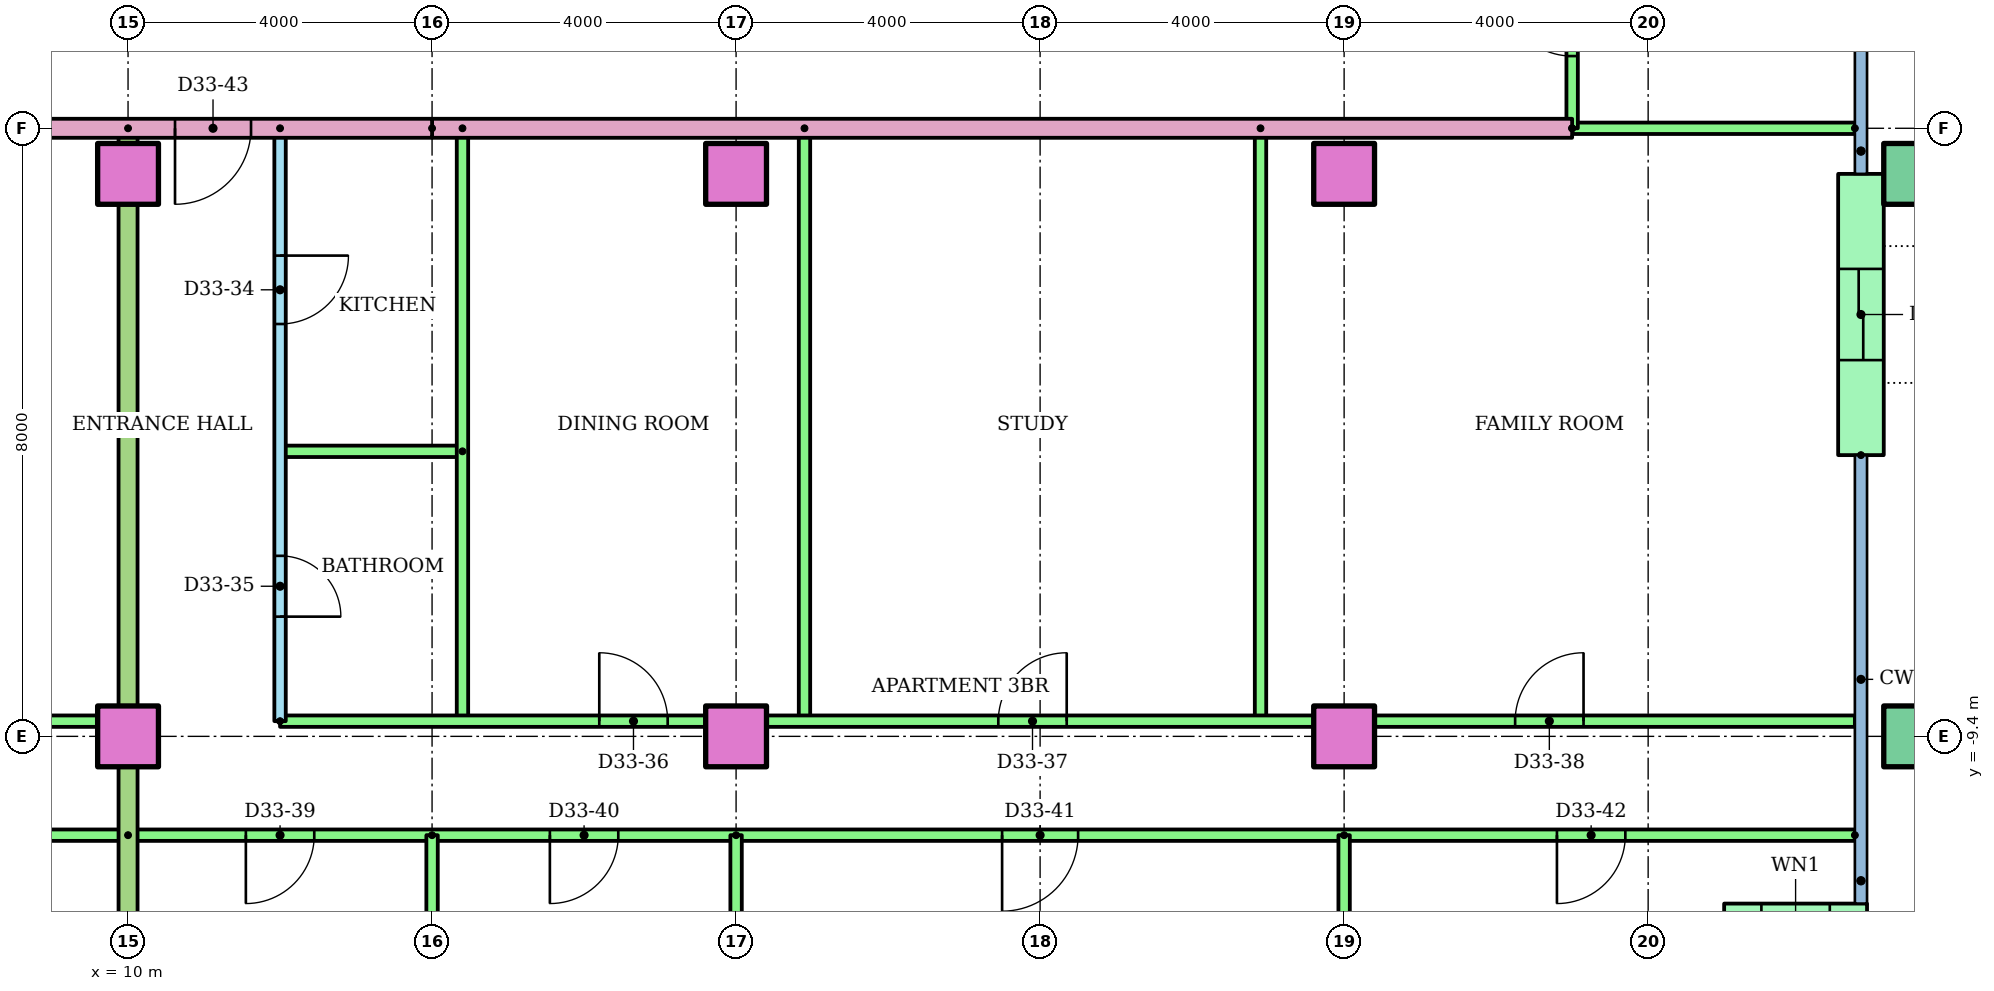
"""IFC4 building model, lengths in metres.
Left out: names, types, materials, properties, quantities, classifications, styles, units other than length and angle.
Written with IfcOpenShell. Run it as: python <this file> out.ifc"""

import sys

from ifc_helpers import new_model, si_unit, direction, frame, frame_2d, origin, origin_2d, place, context, subcontext, project, spatial, rectangle, hollow_rectangle, extrude, element, fill, save


model = new_model("IFC4")
c1 = context("Model", 3, precision=1e-05, world=origin(), true_north=direction((0.0, 1.0)))
c2 = subcontext(c1, "Body", "Model", "MODEL_VIEW")
j1 = project(units=[si_unit("LENGTHUNIT", "METRE"), si_unit("PLANEANGLEUNIT", "RADIAN")], contexts=[c1])
p1 = place(None, origin())
s1 = spatial("IfcSite", under=j1, at=p1, CompositionType="ELEMENT")
p2 = place(p1, origin())
s2 = spatial("IfcBuilding", under=s1, at=p2, CompositionType="ELEMENT")
p3 = place(p2, frame((0.0, 0.0, 129.4)))
s3 = spatial("IfcBuildingStorey", under=s2, at=p3, CompositionType="ELEMENT", Elevation=129.4)
for number, where in (
    (1, (10.0, -9.4, 0.0)),
    (2, (18.0, -9.4, 0.0)),
    (3, (26.0, -9.4, 0.0)),
):
    element("IfcColumn", number, at=place(p3, frame(where)), inside=s3, PredefinedType="COLUMN", context=c2, shape_type="SweptSolid", body=[
        extrude(rectangle(XDim=0.8, YDim=0.8, at=origin_2d()), origin(), (0.0, 0.0, 1.0), 3.2),
    ])
p4 = place(p3, frame((33.5, -9.4, 0.0)))
e4 = element("IfcColumn", 4, at=p4, inside=s3, PredefinedType="COLUMN", context=c2, shape_type="SweptSolid", body=[
    extrude(hollow_rectangle(XDim=0.8, YDim=0.8, WallThickness=0.04, at=origin_2d()), origin(), (0.0, 0.0, 1.0), 3.2),
])
for number, where in (
    (5, (10.0, -2.0, 0.0)),
    (6, (18.0, -2.0, 0.0)),
    (7, (26.0, -2.0, 0.0)),
):
    element("IfcColumn", number, at=place(p3, frame(where)), inside=s3, PredefinedType="COLUMN", context=c2, shape_type="SweptSolid", body=[
        extrude(rectangle(XDim=0.8, YDim=0.8, at=origin_2d()), origin(), (0.0, 0.0, 1.0), 3.2),
    ])
p5 = place(p3, frame((33.5, -2.0, 0.0)))
e8 = element("IfcColumn", 8, at=p5, inside=s3, PredefinedType="COLUMN", context=c2, shape_type="SweptSolid", body=[
    extrude(hollow_rectangle(XDim=0.8, YDim=0.8, WallThickness=0.04, at=origin_2d()), origin(), (0.0, 0.0, 1.0), 3.2),
])
p6 = place(p3, frame((31.0, -11.9, 0.0)))
e9 = element("IfcWall", 9, at=p6, inside=s3, PredefinedType="STANDARD", context=c2, shape_type="SweptSolid", body=[
    extrude(rectangle(XDim=1.88, YDim=0.6, at=frame_2d((0.94, 0.0))), origin(), (0.0, 0.0, 1.0), 2.92),
])
p7 = place(p6, frame((0.49, 0.0, 0.9)))
e10 = element("IfcOpeningElement", 10, at=p7, cuts=e9, PredefinedType="OPENING", context=c2, shape_type="SweptSolid", body=[
    extrude(rectangle(XDim=0.9, YDim=1.5, at=frame_2d((0.45, 0.75))), frame((0.0, 0.31, 0.0), z_axis=(0.0, -1.0, 0.0), x_axis=(1.0, 0.0, 0.0)), (0.0, 0.0, 1.0), 0.62),
])
p8 = place(p3, frame((32.8, -5.7, 0.0), z_axis=(0.0, 0.0, 1.0), x_axis=(0.0, 1.0, 0.0)))
e11 = element("IfcWall", 11, at=p8, inside=s3, PredefinedType="STANDARD", context=c2, shape_type="SweptSolid", body=[
    extrude(rectangle(XDim=3.7, YDim=0.6, at=frame_2d((1.85, 0.0))), origin(), (0.0, 0.0, 1.0), 2.92),
])
p9 = place(p8, frame((1.25, 0.0, 0.0)))
e12 = element("IfcOpeningElement", 12, at=p9, cuts=e11, PredefinedType="OPENING", context=c2, shape_type="SweptSolid", body=[
    extrude(rectangle(XDim=1.2, YDim=2.1, at=frame_2d((0.6, 1.05))), frame((0.0, 0.31, 0.0), z_axis=(0.0, -1.0, 0.0), x_axis=(1.0, 0.0, 0.0)), (0.0, 0.0, 1.0), 0.62),
])
p10 = place(p3, frame((-4.0, -9.2, 0.0)))
e13 = element("IfcWall", 13, at=p10, inside=s3, PredefinedType="PARTITIONING", context=c2, shape_type="SweptSolid", body=[
    extrude(rectangle(XDim=14.0, YDim=0.15, at=frame_2d((7.0, 0.0))), origin(), (0.0, 0.0, 1.0), 2.4),
])
p11 = place(p10, frame((3.45, 0.0, 0.0)))
e14 = element("IfcOpeningElement", 14, at=p11, cuts=e13, PredefinedType="OPENING", context=c2, shape_type="SweptSolid", body=[
    extrude(rectangle(XDim=0.9, YDim=2.1, at=frame_2d((0.45, 1.05))), frame((0.0, 0.085, 0.0), z_axis=(0.0, -1.0, 0.0), x_axis=(1.0, 0.0, 0.0)), (0.0, 0.0, 1.0), 0.17),
])
p12 = place(p10, frame((6.825, 0.0, 0.0)))
e15 = element("IfcOpeningElement", 15, at=p12, cuts=e13, PredefinedType="OPENING", context=c2, shape_type="SweptSolid", body=[
    extrude(rectangle(XDim=0.9, YDim=2.1, at=frame_2d((0.45, 1.05))), frame((0.0, 0.085, 0.0), z_axis=(0.0, -1.0, 0.0), x_axis=(1.0, 0.0, 0.0)), (0.0, 0.0, 1.0), 0.17),
])
p13 = place(p10, frame((11.125, 0.0, 0.0)))
e16 = element("IfcOpeningElement", 16, at=p13, cuts=e13, PredefinedType="OPENING", context=c2, shape_type="SweptSolid", body=[
    extrude(rectangle(XDim=0.9, YDim=2.1, at=frame_2d((0.45, 1.05))), frame((0.0, 0.085, 0.0), z_axis=(0.0, -1.0, 0.0), x_axis=(1.0, 0.0, 0.0)), (0.0, 0.0, 1.0), 0.17),
])
p14 = place(p3, frame((10.0, -10.7, 0.0), z_axis=(0.0, 0.0, 1.0), x_axis=(-1.0, 0.0, 0.0)))
e17 = element("IfcWall", 17, at=p14, inside=s3, PredefinedType="PARTITIONING", context=c2, shape_type="SweptSolid", body=[
    extrude(rectangle(XDim=16.0, YDim=0.15, at=frame_2d((8.0, 0.0))), origin(), (0.0, 0.0, 1.0), 2.4),
])
p15 = place(p14, frame((13.55, 0.0, 0.0)))
e18 = element("IfcOpeningElement", 18, at=p15, cuts=e17, PredefinedType="OPENING", context=c2, shape_type="SweptSolid", body=[
    extrude(rectangle(XDim=0.9, YDim=2.1, at=frame_2d((0.45, 1.05))), frame((0.0, 0.085, 0.0), z_axis=(0.0, -1.0, 0.0), x_axis=(1.0, 0.0, 0.0)), (0.0, 0.0, 1.0), 0.17),
])
p16 = place(p14, frame((9.55, 0.0, 0.0)))
e19 = element("IfcOpeningElement", 19, at=p16, cuts=e17, PredefinedType="OPENING", context=c2, shape_type="SweptSolid", body=[
    extrude(rectangle(XDim=0.9, YDim=2.1, at=frame_2d((0.45, 1.05))), frame((0.0, 0.085, 0.0), z_axis=(0.0, -1.0, 0.0), x_axis=(1.0, 0.0, 0.0)), (0.0, 0.0, 1.0), 0.17),
])
p17 = place(p14, frame((3.5, 0.0, 0.0)))
e20 = element("IfcOpeningElement", 20, at=p17, cuts=e17, PredefinedType="OPENING", context=c2, shape_type="SweptSolid", body=[
    extrude(rectangle(XDim=1.0, YDim=2.1, at=frame_2d((0.5, 1.05))), frame((0.0, 0.085, 0.0), z_axis=(0.0, -1.0, 0.0), x_axis=(1.0, 0.0, 0.0)), (0.0, 0.0, 1.0), 0.17),
])
p18 = place(p3, frame((12.0, -1.4, 0.0), z_axis=(0.0, 0.0, 1.0), x_axis=(0.0, -1.0, 0.0)))
e21 = element("IfcWall", 21, at=p18, inside=s3, PredefinedType="PARTITIONING", context=c2, shape_type="SweptSolid", body=[
    extrude(rectangle(XDim=7.8, YDim=0.15, at=frame_2d((3.9, 0.0))), origin(), (0.0, 0.0, 1.0), 2.4),
])
p19 = place(p18, frame((1.675, 0.0, 0.0)))
e22 = element("IfcOpeningElement", 22, at=p19, cuts=e21, PredefinedType="OPENING", context=c2, shape_type="SweptSolid", body=[
    extrude(rectangle(XDim=0.9, YDim=2.1, at=frame_2d((0.45, 1.05))), frame((0.0, 0.085, 0.0), z_axis=(0.0, -1.0, 0.0), x_axis=(1.0, 0.0, 0.0)), (0.0, 0.0, 1.0), 0.17),
])
p20 = place(p18, frame((5.625, 0.0, 0.0)))
e23 = element("IfcOpeningElement", 23, at=p20, cuts=e21, PredefinedType="OPENING", context=c2, shape_type="SweptSolid", body=[
    extrude(rectangle(XDim=0.8, YDim=2.1, at=frame_2d((0.4, 1.05))), frame((0.0, 0.085, 0.0), z_axis=(0.0, -1.0, 0.0), x_axis=(1.0, 0.0, 0.0)), (0.0, 0.0, 1.0), 0.17),
])
p21 = place(p3, frame((14.4, -5.65, 0.0), z_axis=(0.0, 0.0, 1.0), x_axis=(-1.0, 0.0, 0.0)))
e24 = element("IfcWall", 24, at=p21, inside=s3, PredefinedType="PARTITIONING", context=c2, shape_type="SweptSolid", body=[
    extrude(rectangle(XDim=2.4, YDim=0.15, at=frame_2d((1.2, 0.0))), origin(), (0.0, 0.0, 1.0), 2.4),
])
for number, where, z_axis, x_axis in (
    (25, (14.4, -1.4, 0.0), (0.0, 0.0, 1.0), (0.0, -1.0, 0.0)),
    (26, (18.9, -1.4, 0.0), (0.0, 0.0, 1.0), (0.0, -1.0, 0.0)),
    (27, (24.9, -1.4, 0.0), (0.0, 0.0, 1.0), (0.0, -1.0, 0.0)),
):
    element("IfcWall", number, at=place(p3, frame(where, z_axis=z_axis, x_axis=x_axis)), inside=s3, PredefinedType="PARTITIONING", context=c2, shape_type="SweptSolid", body=[
        extrude(rectangle(XDim=7.8, YDim=0.15, at=frame_2d((3.9, 0.0))), origin(), (0.0, 0.0, 1.0), 2.4),
    ])
p22 = place(p3, frame((12.0, -9.2, 0.0)))
e28 = element("IfcWall", 28, at=p22, inside=s3, PredefinedType="PARTITIONING", context=c2, shape_type="SweptSolid", body=[
    extrude(rectangle(XDim=20.72, YDim=0.15, at=frame_2d((10.36, 0.0))), origin(), (0.0, 0.0, 1.0), 2.4),
])
p23 = place(p22, frame((4.2, 0.0, 0.0)))
e29 = element("IfcOpeningElement", 29, at=p23, cuts=e28, PredefinedType="OPENING", context=c2, shape_type="SweptSolid", body=[
    extrude(rectangle(XDim=0.9, YDim=2.1, at=frame_2d((0.45, 1.05))), frame((0.0, 0.085, 0.0), z_axis=(0.0, -1.0, 0.0), x_axis=(1.0, 0.0, 0.0)), (0.0, 0.0, 1.0), 0.17),
])
p24 = place(p22, frame((9.45, 0.0, 0.0)))
e30 = element("IfcOpeningElement", 30, at=p24, cuts=e28, PredefinedType="OPENING", context=c2, shape_type="SweptSolid", body=[
    extrude(rectangle(XDim=0.9, YDim=2.1, at=frame_2d((0.45, 1.05))), frame((0.0, 0.085, 0.0), z_axis=(0.0, -1.0, 0.0), x_axis=(1.0, 0.0, 0.0)), (0.0, 0.0, 1.0), 0.17),
])
p25 = place(p22, frame((16.25, 0.0, 0.0)))
e31 = element("IfcOpeningElement", 31, at=p25, cuts=e28, PredefinedType="OPENING", context=c2, shape_type="SweptSolid", body=[
    extrude(rectangle(XDim=0.9, YDim=2.1, at=frame_2d((0.45, 1.05))), frame((0.0, 0.085, 0.0), z_axis=(0.0, -1.0, 0.0), x_axis=(1.0, 0.0, 0.0)), (0.0, 0.0, 1.0), 0.17),
])
p26 = place(p3, frame((32.72, -10.7, 0.0), z_axis=(0.0, 0.0, 1.0), x_axis=(-1.0, 0.0, 0.0)))
e32 = element("IfcWall", 32, at=p26, inside=s3, PredefinedType="PARTITIONING", context=c2, shape_type="SweptSolid", body=[
    extrude(rectangle(XDim=22.72, YDim=0.15, at=frame_2d((11.36, 0.0))), origin(), (0.0, 0.0, 1.0), 2.4),
])
p27 = place(p26, frame((20.27, 0.0, 0.0)))
e33 = element("IfcOpeningElement", 33, at=p27, cuts=e32, PredefinedType="OPENING", context=c2, shape_type="SweptSolid", body=[
    extrude(rectangle(XDim=0.9, YDim=2.1, at=frame_2d((0.45, 1.05))), frame((0.0, 0.085, 0.0), z_axis=(0.0, -1.0, 0.0), x_axis=(1.0, 0.0, 0.0)), (0.0, 0.0, 1.0), 0.17),
])
p28 = place(p26, frame((16.27, 0.0, 0.0)))
e34 = element("IfcOpeningElement", 34, at=p28, cuts=e32, PredefinedType="OPENING", context=c2, shape_type="SweptSolid", body=[
    extrude(rectangle(XDim=0.9, YDim=2.1, at=frame_2d((0.45, 1.05))), frame((0.0, 0.085, 0.0), z_axis=(0.0, -1.0, 0.0), x_axis=(1.0, 0.0, 0.0)), (0.0, 0.0, 1.0), 0.17),
])
p29 = place(p26, frame((10.22, 0.0, 0.0)))
e35 = element("IfcOpeningElement", 35, at=p29, cuts=e32, PredefinedType="OPENING", context=c2, shape_type="SweptSolid", body=[
    extrude(rectangle(XDim=1.0, YDim=2.1, at=frame_2d((0.5, 1.05))), frame((0.0, 0.085, 0.0), z_axis=(0.0, -1.0, 0.0), x_axis=(1.0, 0.0, 0.0)), (0.0, 0.0, 1.0), 0.17),
])
p30 = place(p26, frame((3.02, 0.0, 0.0)))
e36 = element("IfcOpeningElement", 36, at=p30, cuts=e32, PredefinedType="OPENING", context=c2, shape_type="SweptSolid", body=[
    extrude(rectangle(XDim=0.9, YDim=2.1, at=frame_2d((0.45, 1.05))), frame((0.0, 0.085, 0.0), z_axis=(0.0, -1.0, 0.0), x_axis=(1.0, 0.0, 0.0)), (0.0, 0.0, 1.0), 0.17),
])
p31 = place(p3, frame((14.0, -10.7, 0.0), z_axis=(0.0, 0.0, 1.0), x_axis=(0.0, -1.0, 0.0)))
e37 = element("IfcWall", 37, at=p31, inside=s3, PredefinedType="PARTITIONING", context=c2, shape_type="SweptSolid", body=[
    extrude(rectangle(XDim=5.621, YDim=0.15, at=frame_2d((2.811, 0.0))), origin(), (0.0, 0.0, 1.0), 2.4),
])
for number, where, z_axis, x_axis in (
    (38, (18.0, -10.7, 0.0), (0.0, 0.0, 1.0), (0.0, -1.0, 0.0)),
    (39, (26.0, -10.7, 0.0), (0.0, 0.0, 1.0), (0.0, -1.0, 0.0)),
):
    element("IfcWall", number, at=place(p3, frame(where, z_axis=z_axis, x_axis=x_axis)), inside=s3, PredefinedType="PARTITIONING", context=c2, shape_type="SweptSolid", body=[
        extrude(rectangle(XDim=5.61, YDim=0.15, at=frame_2d((2.805, 0.0))), origin(), (0.0, 0.0, 1.0), 2.4),
    ])
p32 = place(p3, frame((10.0, -1.4, 0.0), z_axis=(0.0, 0.0, 1.0), x_axis=(0.0, -1.0, 0.0)))
e40 = element("IfcWall", 40, at=p32, inside=s3, PredefinedType="PARTITIONING", context=c2, shape_type="SweptSolid", body=[
    extrude(rectangle(XDim=14.91, YDim=0.25, at=frame_2d((7.455, 0.0))), origin(), (0.0, 0.0, 1.0), 2.4),
])
p33 = place(p3, frame((29.0, -1.4, 0.0), z_axis=(0.0, 0.0, 1.0), x_axis=(-1.0, 0.0, 0.0)))
e41 = element("IfcWall", 41, at=p33, inside=s3, PredefinedType="PARTITIONING", context=c2, shape_type="SweptSolid", body=[
    extrude(rectangle(XDim=15.0, YDim=0.25, at=frame_2d((7.5, 0.0))), origin(), (0.0, 0.0, 1.0), 2.4),
])
p34 = place(p3, frame((32.72, -1.4, 0.0), z_axis=(0.0, 0.0, 1.0), x_axis=(-1.0, 0.0, 0.0)))
e42 = element("IfcWall", 42, at=p34, inside=s3, PredefinedType="PARTITIONING", context=c2, shape_type="SweptSolid", body=[
    extrude(rectangle(XDim=3.72, YDim=0.15, at=frame_2d((1.86, 0.0))), origin(), (0.0, 0.0, 1.0), 2.4),
])
p35 = place(p3, frame((29.0, -1.4, 0.0), z_axis=(0.0, 0.0, 1.0), x_axis=(0.0, 1.0, 0.0)))
e43 = element("IfcWall", 43, at=p35, inside=s3, PredefinedType="PARTITIONING", context=c2, shape_type="SweptSolid", body=[
    extrude(rectangle(XDim=2.8, YDim=0.15, at=frame_2d((1.4, 0.0))), origin(), (0.0, 0.0, 1.0), 2.4),
])
p36 = place(p35, frame((0.95, 0.0, 0.0)))
e44 = element("IfcOpeningElement", 44, at=p36, cuts=e43, PredefinedType="OPENING", context=c2, shape_type="SweptSolid", body=[
    extrude(rectangle(XDim=0.9, YDim=2.1, at=frame_2d((0.45, 1.05))), frame((0.0, 0.085, 0.0), z_axis=(0.0, -1.0, 0.0), x_axis=(1.0, 0.0, 0.0)), (0.0, 0.0, 1.0), 0.17),
])
p37 = place(p3, frame((14.0, -1.4, 0.0), z_axis=(0.0, 0.0, 1.0), x_axis=(-1.0, 0.0, 0.0)))
e45 = element("IfcWall", 45, at=p37, inside=s3, PredefinedType="PARTITIONING", context=c2, shape_type="SweptSolid", body=[
    extrude(rectangle(XDim=28.0, YDim=0.25, at=frame_2d((14.0, 0.0))), origin(), (0.0, 0.0, 1.0), 2.4),
])
p38 = place(p37, frame((20.618, 0.0, 0.0)))
e46 = element("IfcOpeningElement", 46, at=p38, cuts=e45, PredefinedType="OPENING", context=c2, shape_type="SweptSolid", body=[
    extrude(rectangle(XDim=1.0, YDim=2.1, at=frame_2d((0.5, 1.05))), frame((0.0, 0.135, 0.0), z_axis=(0.0, -1.0, 0.0), x_axis=(1.0, 0.0, 0.0)), (0.0, 0.0, 1.0), 0.27),
])
p39 = place(p37, frame((18.382, 0.0, 0.0)))
e47 = element("IfcOpeningElement", 47, at=p39, cuts=e45, PredefinedType="OPENING", context=c2, shape_type="SweptSolid", body=[
    extrude(rectangle(XDim=1.0, YDim=2.1, at=frame_2d((0.5, 1.05))), frame((0.0, 0.135, 0.0), z_axis=(0.0, -1.0, 0.0), x_axis=(1.0, 0.0, 0.0)), (0.0, 0.0, 1.0), 0.27),
])
p40 = place(p37, frame((2.382, 0.0, 0.0)))
e48 = element("IfcOpeningElement", 48, at=p40, cuts=e45, PredefinedType="OPENING", context=c2, shape_type="SweptSolid", body=[
    extrude(rectangle(XDim=1.0, YDim=2.1, at=frame_2d((0.5, 1.05))), frame((0.0, 0.135, 0.0), z_axis=(0.0, -1.0, 0.0), x_axis=(1.0, 0.0, 0.0)), (0.0, 0.0, 1.0), 0.27),
])
p41 = place(p19, origin())
e49 = element("IfcDoor", 49, at=p41, inside=s3, OperationType="SINGLE_SWING_LEFT", PredefinedType="DOOR", context=c2, shape_type="SweptSolid", body=[
    extrude(rectangle(XDim=0.9, YDim=2.1, at=frame_2d((0.45, 1.05))), frame((0.0, 0.025, 0.0), z_axis=(0.0, -1.0, 0.0), x_axis=(1.0, 0.0, 0.0)), (0.0, 0.0, 1.0), 0.05),
])
fill(e22, e49)
p42 = place(p20, origin())
e50 = element("IfcDoor", 50, at=p42, inside=s3, OperationType="SINGLE_SWING_RIGHT", PredefinedType="DOOR", context=c2, shape_type="SweptSolid", body=[
    extrude(rectangle(XDim=0.8, YDim=2.1, at=frame_2d((0.4, 1.05))), frame((0.0, 0.025, 0.0), z_axis=(0.0, -1.0, 0.0), x_axis=(1.0, 0.0, 0.0)), (0.0, 0.0, 1.0), 0.05),
])
fill(e23, e50)
p43 = place(p23, origin())
e51 = element("IfcDoor", 51, at=p43, inside=s3, OperationType="SINGLE_SWING_LEFT", PredefinedType="DOOR", context=c2, shape_type="SweptSolid", body=[
    extrude(rectangle(XDim=0.9, YDim=2.1, at=frame_2d((0.45, 1.05))), frame((0.0, 0.025, 0.0), z_axis=(0.0, -1.0, 0.0), x_axis=(1.0, 0.0, 0.0)), (0.0, 0.0, 1.0), 0.05),
])
fill(e29, e51)
p44 = place(p24, origin())
e52 = element("IfcDoor", 52, at=p44, inside=s3, OperationType="SINGLE_SWING_RIGHT", PredefinedType="DOOR", context=c2, shape_type="SweptSolid", body=[
    extrude(rectangle(XDim=0.9, YDim=2.1, at=frame_2d((0.45, 1.05))), frame((0.0, 0.025, 0.0), z_axis=(0.0, -1.0, 0.0), x_axis=(1.0, 0.0, 0.0)), (0.0, 0.0, 1.0), 0.05),
])
fill(e30, e52)
p45 = place(p25, origin())
e53 = element("IfcDoor", 53, at=p45, inside=s3, OperationType="SINGLE_SWING_RIGHT", PredefinedType="DOOR", context=c2, shape_type="SweptSolid", body=[
    extrude(rectangle(XDim=0.9, YDim=2.1, at=frame_2d((0.45, 1.05))), frame((0.0, 0.025, 0.0), z_axis=(0.0, -1.0, 0.0), x_axis=(1.0, 0.0, 0.0)), (0.0, 0.0, 1.0), 0.05),
])
fill(e31, e53)
p46 = place(p27, origin())
e54 = element("IfcDoor", 54, at=p46, inside=s3, OperationType="SINGLE_SWING_RIGHT", PredefinedType="DOOR", context=c2, shape_type="SweptSolid", body=[
    extrude(rectangle(XDim=0.9, YDim=2.1, at=frame_2d((0.45, 1.05))), frame((0.0, 0.025, 0.0), z_axis=(0.0, -1.0, 0.0), x_axis=(1.0, 0.0, 0.0)), (0.0, 0.0, 1.0), 0.05),
])
fill(e33, e54)
p47 = place(p28, origin())
e55 = element("IfcDoor", 55, at=p47, inside=s3, OperationType="SINGLE_SWING_RIGHT", PredefinedType="DOOR", context=c2, shape_type="SweptSolid", body=[
    extrude(rectangle(XDim=0.9, YDim=2.1, at=frame_2d((0.45, 1.05))), frame((0.0, 0.025, 0.0), z_axis=(0.0, -1.0, 0.0), x_axis=(1.0, 0.0, 0.0)), (0.0, 0.0, 1.0), 0.05),
])
fill(e34, e55)
p48 = place(p29, origin())
e56 = element("IfcDoor", 56, at=p48, inside=s3, OperationType="SINGLE_SWING_RIGHT", PredefinedType="DOOR", context=c2, shape_type="SweptSolid", body=[
    extrude(rectangle(XDim=1.0, YDim=2.1, at=frame_2d((0.5, 1.05))), frame((0.0, 0.025, 0.0), z_axis=(0.0, -1.0, 0.0), x_axis=(1.0, 0.0, 0.0)), (0.0, 0.0, 1.0), 0.05),
])
fill(e35, e56)
p49 = place(p30, origin())
e57 = element("IfcDoor", 57, at=p49, inside=s3, OperationType="SINGLE_SWING_RIGHT", PredefinedType="DOOR", context=c2, shape_type="SweptSolid", body=[
    extrude(rectangle(XDim=0.9, YDim=2.1, at=frame_2d((0.45, 1.05))), frame((0.0, 0.025, 0.0), z_axis=(0.0, -1.0, 0.0), x_axis=(1.0, 0.0, 0.0)), (0.0, 0.0, 1.0), 0.05),
])
fill(e36, e57)
p50 = place(p40, origin())
e58 = element("IfcDoor", 58, at=p50, inside=s3, OperationType="SINGLE_SWING_RIGHT", PredefinedType="DOOR", context=c2, shape_type="SweptSolid", body=[
    extrude(rectangle(XDim=1.0, YDim=2.1, at=frame_2d((0.5, 1.05))), frame((0.0, 0.025, 0.0), z_axis=(0.0, -1.0, 0.0), x_axis=(1.0, 0.0, 0.0)), (0.0, 0.0, 1.0), 0.05),
])
fill(e48, e58)
p51 = place(p36, origin())
e59 = element("IfcDoor", 59, at=p51, inside=s3, OperationType="SINGLE_SWING_RIGHT", PredefinedType="DOOR", context=c2, shape_type="SweptSolid", body=[
    extrude(rectangle(XDim=0.9, YDim=2.1, at=frame_2d((0.45, 1.05))), frame((0.0, 0.025, 0.0), z_axis=(0.0, -1.0, 0.0), x_axis=(1.0, 0.0, 0.0)), (0.0, 0.0, 1.0), 0.05),
])
fill(e44, e59)
p52 = place(p9, origin())
e60 = element("IfcDoor", 60, at=p52, inside=s3, OperationType="SLIDING_TO_LEFT", PredefinedType="DOOR", context=c2, shape_type="SweptSolid", body=[
    extrude(rectangle(XDim=1.2, YDim=2.1, at=frame_2d((0.6, 1.05))), frame((0.0, 0.025, 0.0), z_axis=(0.0, -1.0, 0.0), x_axis=(1.0, 0.0, 0.0)), (0.0, 0.0, 1.0), 0.05),
])
fill(e12, e60)
save(model, sys.argv[1])
